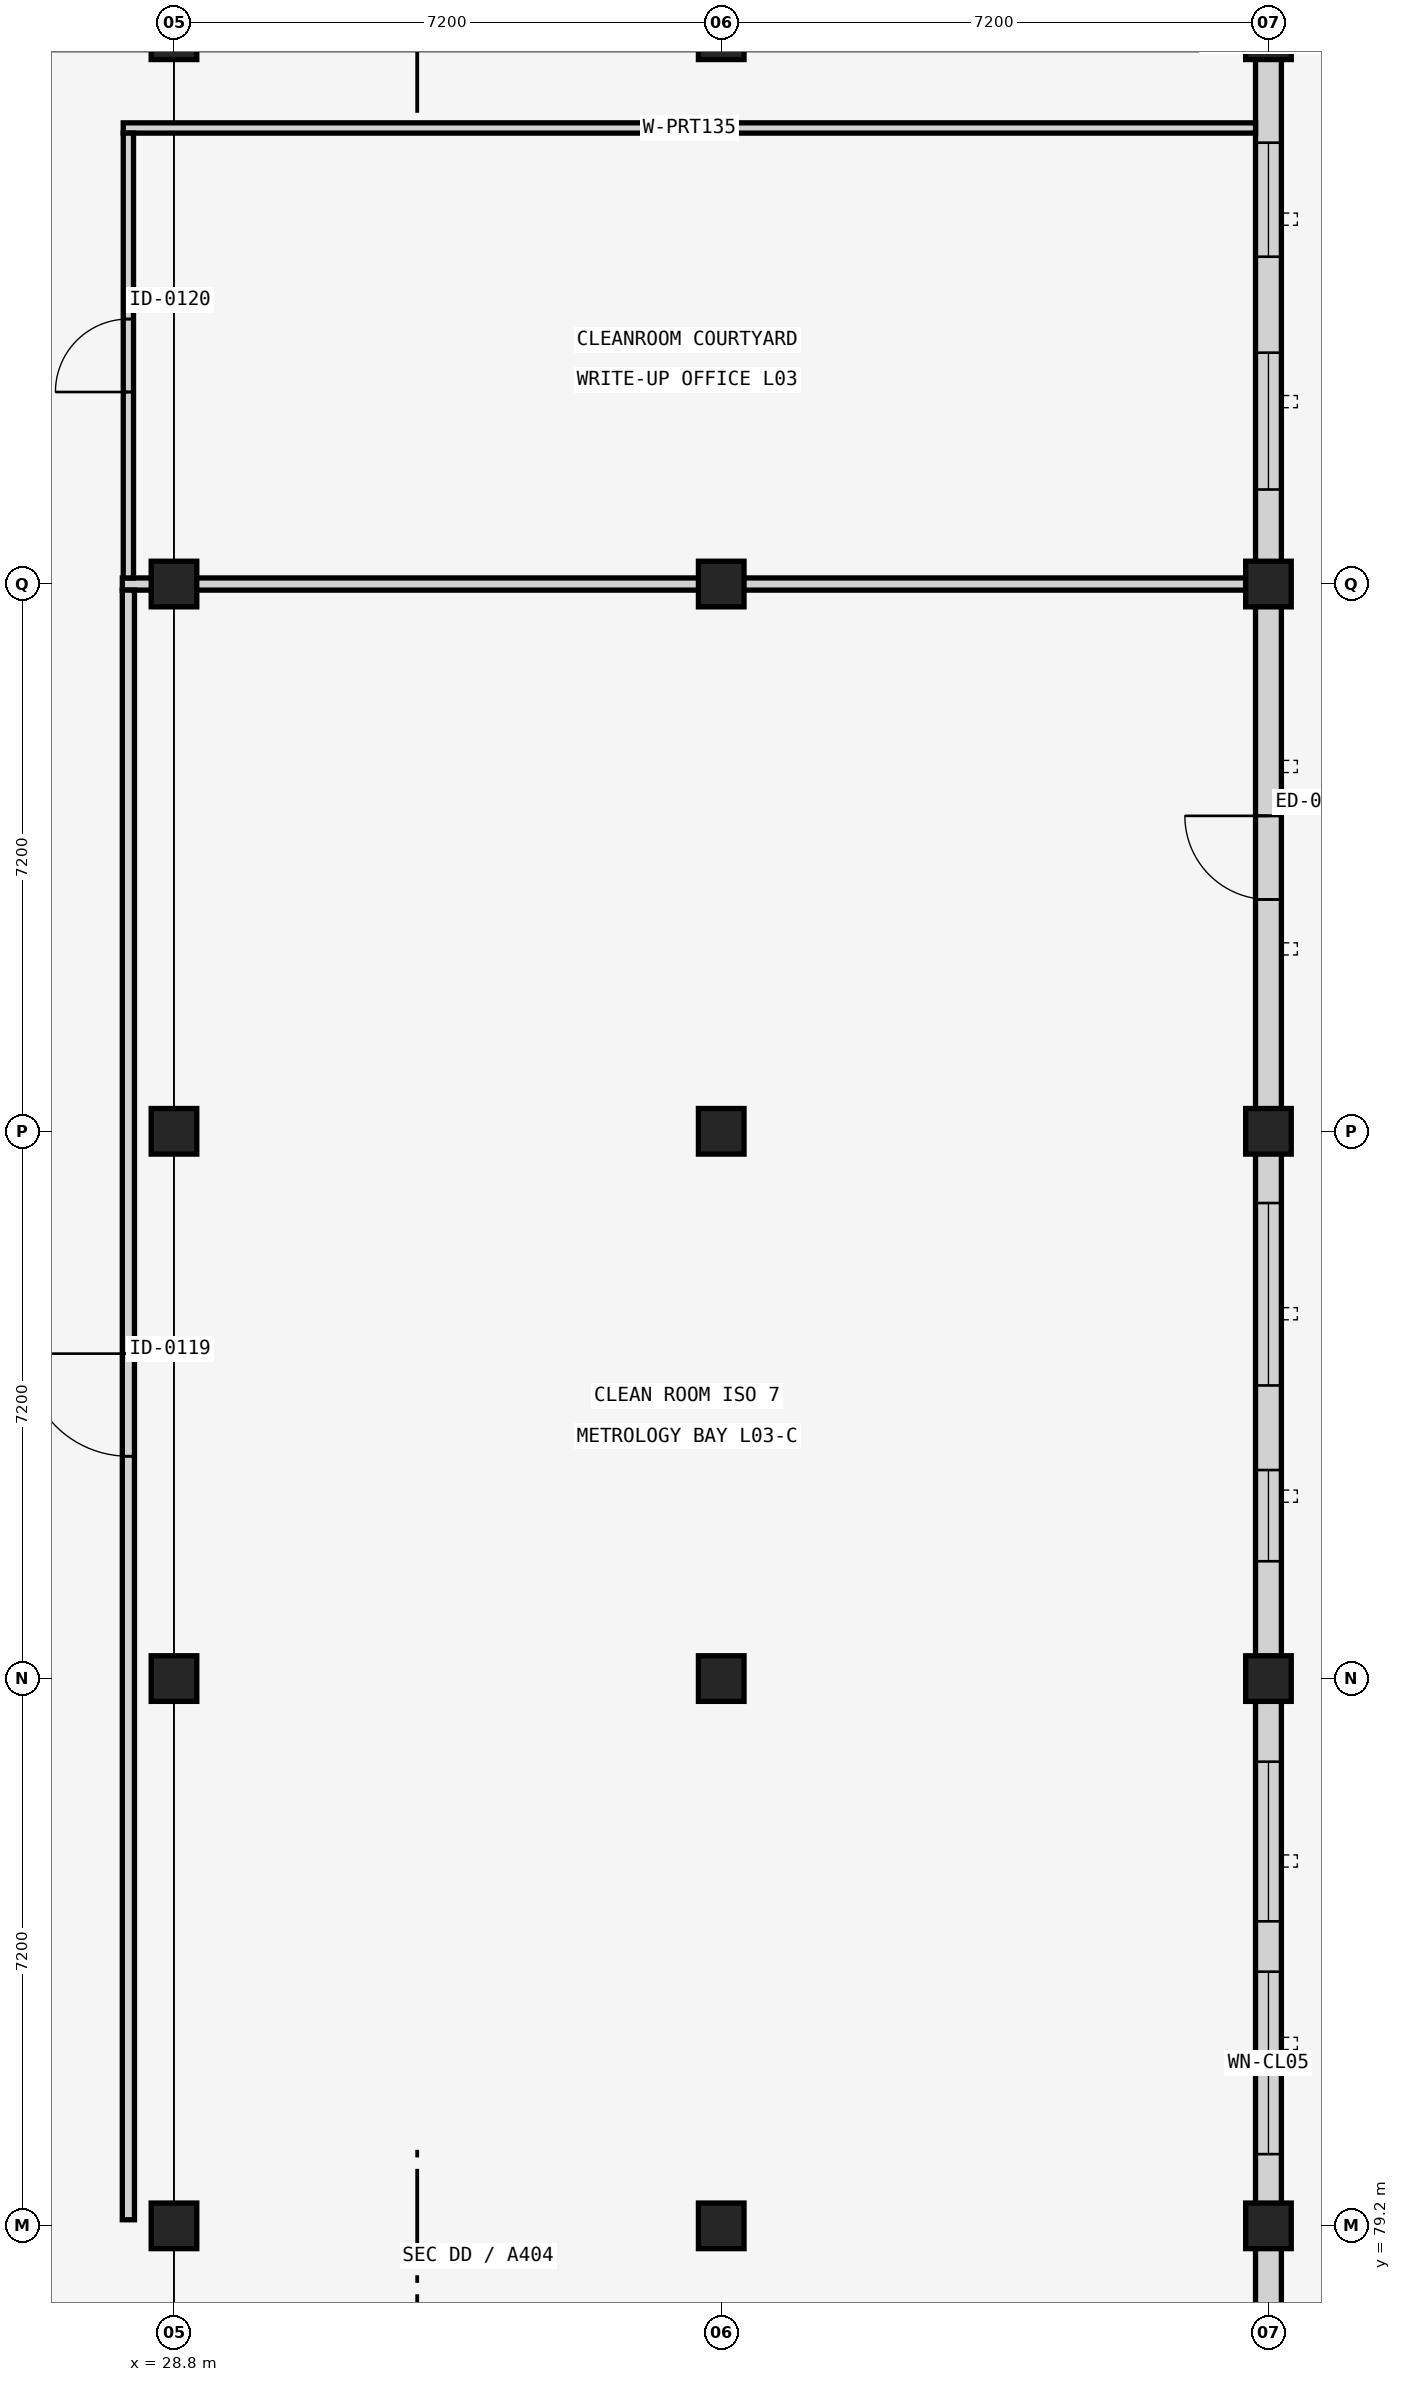
"""IFC4 building model, lengths in metres.
Left out: names, types, materials, properties, quantities, classifications, styles, units other than length and angle.
Written with IfcOpenShell. Run it as: python <this file> out.ifc"""

import sys

from ifc_helpers import new_model, si_unit, direction, frame, frame_2d, origin, origin_2d, place, context, subcontext, project, spatial, rectangle, extrude, element, fill, save


model = new_model("IFC4")
c1 = context("Model", 3, precision=1e-05, world=origin(), true_north=direction((0.0, 1.0)))
c2 = subcontext(c1, "Body", "Model", "MODEL_VIEW")
j1 = project(units=[si_unit("LENGTHUNIT", "METRE"), si_unit("PLANEANGLEUNIT", "RADIAN")], contexts=[c1])
p1 = place(None, origin())
s1 = spatial("IfcSite", under=j1, at=p1, CompositionType="ELEMENT")
p2 = place(p1, origin())
s2 = spatial("IfcBuilding", under=s1, at=p2, CompositionType="ELEMENT")
p3 = place(p2, frame((0.0, 0.0, 13.12)))
s3 = spatial("IfcBuildingStorey", under=s2, at=p3, CompositionType="ELEMENT", Elevation=13.12)
for number, where, z_axis, x_axis in (
    (1, (28.8, 79.2, 0.0), (0.0, 0.0, 1.0), (1.0, 0.0, 0.0)),
    (2, (28.8, 86.4, 0.0), (0.0, 0.0, 1.0), (1.0, 0.0, 0.0)),
    (3, (28.8, 93.6, 0.0), (0.0, 0.0, 1.0), (1.0, 0.0, 0.0)),
    (4, (28.8, 100.8, 0.0), (0.0, 0.0, 1.0), (1.0, 0.0, 0.0)),
    (5, (28.8, 108.0, 0.0), (0.0, 0.0, 1.0), (1.0, 0.0, 0.0)),
    (6, (36.0, 79.2, 0.0), (0.0, 0.0, 1.0), (1.0, 0.0, 0.0)),
    (7, (36.0, 86.4, 0.0), (0.0, 0.0, 1.0), (1.0, 0.0, 0.0)),
    (8, (36.0, 93.6, 0.0), (0.0, 0.0, 1.0), (1.0, 0.0, 0.0)),
    (9, (36.0, 100.8, 0.0), (0.0, 0.0, 1.0), (1.0, 0.0, 0.0)),
    (10, (36.0, 108.0, 0.0), (0.0, 0.0, 1.0), (1.0, 0.0, 0.0)),
    (11, (43.2, 79.2, 0.0), (0.0, 0.0, 1.0), (1.0, 0.0, 0.0)),
    (12, (43.2, 86.4, 0.0), (0.0, 0.0, 1.0), (1.0, 0.0, 0.0)),
    (13, (43.2, 93.6, 0.0), (0.0, 0.0, 1.0), (1.0, 0.0, 0.0)),
    (14, (43.2, 100.8, 0.0), (0.0, 0.0, 1.0), (1.0, 0.0, 0.0)),
    (15, (43.2, 108.0, 0.0), (0.0, 0.0, 1.0), (1.0, 0.0, 0.0)),
):
    element("IfcColumn", number, at=place(p3, frame(where, z_axis=z_axis, x_axis=x_axis)), inside=s3, PredefinedType="COLUMN", context=c2, shape_type="SweptSolid", body=[
        extrude(rectangle(XDim=0.6, YDim=0.6, at=origin_2d()), origin(), (0.0, 0.0, 1.0), 4.16),
    ])
p4 = place(p3, frame((43.2, 72.29, 0.0), z_axis=(0.0, 0.0, 1.0), x_axis=(0.0, 1.0, 0.0)))
e16 = element("IfcWall", 16, at=p4, inside=s3, PredefinedType="SOLIDWALL", context=c2, shape_type="SweptSolid", body=[
    extrude(rectangle(XDim=6.62, YDim=0.34, at=frame_2d((3.31, 0.0))), origin(), (0.0, 0.0, 1.0), 3.16),
])
p5 = place(p4, frame((0.804, 0.0, 1.0)))
e17 = element("IfcOpeningElement", 17, at=p5, cuts=e16, PredefinedType="OPENING", context=c2, shape_type="SweptSolid", body=[
    extrude(rectangle(XDim=2.1, YDim=1.5, at=frame_2d((1.05, 0.75))), frame((0.0, 0.18, 0.0), z_axis=(0.0, -1.0, 0.0), x_axis=(1.0, 0.0, 0.0)), (0.0, 0.0, 1.0), 0.36),
])
p6 = place(p4, frame((3.866, 0.0, 1.0)))
e18 = element("IfcOpeningElement", 18, at=p6, cuts=e16, PredefinedType="OPENING", context=c2, shape_type="SweptSolid", body=[
    extrude(rectangle(XDim=1.8, YDim=1.65, at=frame_2d((0.9, 0.825))), frame((0.0, 0.18, 0.0), z_axis=(0.0, -1.0, 0.0), x_axis=(1.0, 0.0, 0.0)), (0.0, 0.0, 1.0), 0.36),
])
p7 = place(p3, frame((43.2, 79.49, 0.0), z_axis=(0.0, 0.0, 1.0), x_axis=(0.0, 1.0, 0.0)))
e19 = element("IfcWall", 19, at=p7, inside=s3, PredefinedType="SOLIDWALL", context=c2, shape_type="SweptSolid", body=[
    extrude(rectangle(XDim=6.62, YDim=0.34, at=frame_2d((3.31, 0.0))), origin(), (0.0, 0.0, 1.0), 3.16),
])
p8 = place(p7, frame((0.654, 0.0, 1.0)))
e20 = element("IfcOpeningElement", 20, at=p8, cuts=e19, PredefinedType="OPENING", context=c2, shape_type="SweptSolid", body=[
    extrude(rectangle(XDim=2.4, YDim=1.5, at=frame_2d((1.2, 0.75))), frame((0.0, 0.18, 0.0), z_axis=(0.0, -1.0, 0.0), x_axis=(1.0, 0.0, 0.0)), (0.0, 0.0, 1.0), 0.36),
])
p9 = place(p7, frame((3.716, 0.0, 1.0)))
e21 = element("IfcOpeningElement", 21, at=p9, cuts=e19, PredefinedType="OPENING", context=c2, shape_type="SweptSolid", body=[
    extrude(rectangle(XDim=2.1, YDim=1.65, at=frame_2d((1.05, 0.825))), frame((0.0, 0.18, 0.0), z_axis=(0.0, -1.0, 0.0), x_axis=(1.0, 0.0, 0.0)), (0.0, 0.0, 1.0), 0.36),
])
p10 = place(p3, frame((43.2, 86.69, 0.0), z_axis=(0.0, 0.0, 1.0), x_axis=(0.0, 1.0, 0.0)))
e22 = element("IfcWall", 22, at=p10, inside=s3, PredefinedType="SOLIDWALL", context=c2, shape_type="SweptSolid", body=[
    extrude(rectangle(XDim=6.62, YDim=0.34, at=frame_2d((3.31, 0.0))), origin(), (0.0, 0.0, 1.0), 3.16),
])
p11 = place(p10, frame((1.254, 0.0, 1.0)))
e23 = element("IfcOpeningElement", 23, at=p11, cuts=e22, PredefinedType="OPENING", context=c2, shape_type="SweptSolid", body=[
    extrude(rectangle(XDim=1.2, YDim=1.65, at=frame_2d((0.6, 0.825))), frame((0.0, 0.18, 0.0), z_axis=(0.0, -1.0, 0.0), x_axis=(1.0, 0.0, 0.0)), (0.0, 0.0, 1.0), 0.36),
])
p12 = place(p10, frame((3.566, 0.0, 1.0)))
e24 = element("IfcOpeningElement", 24, at=p12, cuts=e22, PredefinedType="OPENING", context=c2, shape_type="SweptSolid", body=[
    extrude(rectangle(XDim=2.4, YDim=1.65, at=frame_2d((1.2, 0.825))), frame((0.0, 0.18, 0.0), z_axis=(0.0, -1.0, 0.0), x_axis=(1.0, 0.0, 0.0)), (0.0, 0.0, 1.0), 0.36),
])
p13 = place(p3, frame((43.2, 93.89, 0.0), z_axis=(0.0, 0.0, 1.0), x_axis=(0.0, 1.0, 0.0)))
e25 = element("IfcWall", 25, at=p13, inside=s3, PredefinedType="SOLIDWALL", context=c2, shape_type="SweptSolid", body=[
    extrude(rectangle(XDim=6.62, YDim=0.34, at=frame_2d((3.31, 0.0))), origin(), (0.0, 0.0, 1.0), 3.16),
])
p14 = place(p13, frame((2.76, 0.0, 0.0)))
e26 = element("IfcOpeningElement", 26, at=p14, cuts=e25, PredefinedType="OPENING", context=c2, shape_type="SweptSolid", body=[
    extrude(rectangle(XDim=1.1, YDim=2.2, at=frame_2d((0.55, 1.1))), frame((0.0, 0.18, 0.0), z_axis=(0.0, -1.0, 0.0), x_axis=(1.0, 0.0, 0.0)), (0.0, 0.0, 1.0), 0.36),
])
p15 = place(p3, frame((43.2, 101.09, 0.0), z_axis=(0.0, 0.0, 1.0), x_axis=(0.0, 1.0, 0.0)))
e27 = element("IfcWall", 27, at=p15, inside=s3, PredefinedType="SOLIDWALL", context=c2, shape_type="SweptSolid", body=[
    extrude(rectangle(XDim=6.62, YDim=0.34, at=frame_2d((3.31, 0.0))), origin(), (0.0, 0.0, 1.0), 3.16),
])
p16 = place(p15, frame((0.954, 0.0, 1.0)))
e28 = element("IfcOpeningElement", 28, at=p16, cuts=e27, PredefinedType="OPENING", context=c2, shape_type="SweptSolid", body=[
    extrude(rectangle(XDim=1.8, YDim=1.65, at=frame_2d((0.9, 0.825))), frame((0.0, 0.18, 0.0), z_axis=(0.0, -1.0, 0.0), x_axis=(1.0, 0.0, 0.0)), (0.0, 0.0, 1.0), 0.36),
])
p17 = place(p15, frame((4.016, 0.0, 1.0)))
e29 = element("IfcOpeningElement", 29, at=p17, cuts=e27, PredefinedType="OPENING", context=c2, shape_type="SweptSolid", body=[
    extrude(rectangle(XDim=1.5, YDim=1.5, at=frame_2d((0.75, 0.75))), frame((0.0, 0.18, 0.0), z_axis=(0.0, -1.0, 0.0), x_axis=(1.0, 0.0, 0.0)), (0.0, 0.0, 1.0), 0.36),
])
p18 = place(p3, frame((28.12, 100.8, 0.0), z_axis=(0.0, 0.0, 1.0), x_axis=(1.0, 0.0, 0.0)))
e30 = element("IfcWall", 30, at=p18, inside=s3, PredefinedType="PARTITIONING", context=c2, shape_type="SweptSolid", body=[
    extrude(rectangle(XDim=14.91, YDim=0.16, at=frame_2d((7.455, 0.0))), origin(), (0.0, 0.0, 1.0), 3.16),
])
p19 = place(p3, frame((28.2, 79.28, 0.0), z_axis=(0.0, 0.0, 1.0), x_axis=(0.0, 1.0, 0.0)))
e31 = element("IfcWall", 31, at=p19, inside=s3, PredefinedType="PARTITIONING", context=c2, shape_type="SweptSolid", body=[
    extrude(rectangle(XDim=21.44, YDim=0.16, at=frame_2d((10.72, 0.0))), origin(), (0.0, 0.0, 1.0), 3.16),
])
p20 = place(p19, frame((10.045, 0.0, 0.0)))
e32 = element("IfcOpeningElement", 32, at=p20, cuts=e31, PredefinedType="OPENING", context=c2, shape_type="SweptSolid", body=[
    extrude(rectangle(XDim=1.35, YDim=2.2, at=frame_2d((0.675, 1.1))), frame((0.0, 0.09, 0.0), z_axis=(0.0, -1.0, 0.0), x_axis=(1.0, 0.0, 0.0)), (0.0, 0.0, 1.0), 0.18),
])
p21 = place(p3, frame((28.133, 106.8, 0.0), z_axis=(0.0, 0.0, 1.0), x_axis=(1.0, 0.0, 0.0)))
e33 = element("IfcWall", 33, at=p21, inside=s3, PredefinedType="PARTITIONING", context=c2, shape_type="SweptSolid", body=[
    extrude(rectangle(XDim=14.897, YDim=0.135, at=frame_2d((7.449, 0.0))), origin(), (0.0, 0.0, 1.0), 3.21),
])
p22 = place(p3, frame((28.2, 100.88, 0.0), z_axis=(0.0, 0.0, 1.0), x_axis=(0.0, 1.0, 0.0)))
e34 = element("IfcWall", 34, at=p22, inside=s3, PredefinedType="PARTITIONING", context=c2, shape_type="SweptSolid", body=[
    extrude(rectangle(XDim=5.853, YDim=0.135, at=frame_2d((2.926, 0.0))), origin(), (0.0, 0.0, 1.0), 3.16),
])
p23 = place(p22, frame((2.446, 0.0, 0.0)))
e35 = element("IfcOpeningElement", 35, at=p23, cuts=e34, PredefinedType="OPENING", context=c2, shape_type="SweptSolid", body=[
    extrude(rectangle(XDim=0.96, YDim=2.15, at=frame_2d((0.48, 1.075))), frame((0.0, 0.078, 0.0), z_axis=(0.0, -1.0, 0.0), x_axis=(1.0, 0.0, 0.0)), (0.0, 0.0, 1.0), 0.155),
])
p24 = place(p8, origin())
e36 = element("IfcWindow", 36, at=p24, inside=s3, PartitioningType="SINGLE_PANEL", PredefinedType="WINDOW", context=c2, shape_type="SweptSolid", body=[
    extrude(rectangle(XDim=2.4, YDim=1.5, at=frame_2d((1.2, 0.75))), frame((0.0, 0.03, 0.0), z_axis=(0.0, -1.0, 0.0), x_axis=(1.0, 0.0, 0.0)), (0.0, 0.0, 1.0), 0.06),
])
fill(e20, e36)
p25 = place(p9, origin())
e37 = element("IfcWindow", 37, at=p25, inside=s3, PartitioningType="SINGLE_PANEL", PredefinedType="WINDOW", context=c2, shape_type="SweptSolid", body=[
    extrude(rectangle(XDim=2.1, YDim=1.65, at=frame_2d((1.05, 0.825))), frame((0.0, 0.03, 0.0), z_axis=(0.0, -1.0, 0.0), x_axis=(1.0, 0.0, 0.0)), (0.0, 0.0, 1.0), 0.06),
])
fill(e21, e37)
p26 = place(p11, origin())
e38 = element("IfcWindow", 38, at=p26, inside=s3, PartitioningType="SINGLE_PANEL", PredefinedType="WINDOW", context=c2, shape_type="SweptSolid", body=[
    extrude(rectangle(XDim=1.2, YDim=1.65, at=frame_2d((0.6, 0.825))), frame((0.0, 0.03, 0.0), z_axis=(0.0, -1.0, 0.0), x_axis=(1.0, 0.0, 0.0)), (0.0, 0.0, 1.0), 0.06),
])
fill(e23, e38)
p27 = place(p12, origin())
e39 = element("IfcWindow", 39, at=p27, inside=s3, PartitioningType="SINGLE_PANEL", PredefinedType="WINDOW", context=c2, shape_type="SweptSolid", body=[
    extrude(rectangle(XDim=2.4, YDim=1.65, at=frame_2d((1.2, 0.825))), frame((0.0, 0.03, 0.0), z_axis=(0.0, -1.0, 0.0), x_axis=(1.0, 0.0, 0.0)), (0.0, 0.0, 1.0), 0.06),
])
fill(e24, e39)
p28 = place(p14, frame((1.1, 0.0, 0.0), z_axis=(0.0, 0.0, 1.0), x_axis=(-1.0, 0.0, 0.0)))
e40 = element("IfcDoor", 40, at=p28, inside=s3, OperationType="SINGLE_SWING_RIGHT", PredefinedType="DOOR", context=c2, shape_type="SweptSolid", body=[
    extrude(rectangle(XDim=1.1, YDim=2.2, at=frame_2d((0.55, 1.1))), frame((0.0, 0.025, 0.0), z_axis=(0.0, -1.0, 0.0), x_axis=(1.0, 0.0, 0.0)), (0.0, 0.0, 1.0), 0.05),
])
fill(e26, e40)
p29 = place(p16, origin())
e41 = element("IfcWindow", 41, at=p29, inside=s3, PartitioningType="SINGLE_PANEL", PredefinedType="WINDOW", context=c2, shape_type="SweptSolid", body=[
    extrude(rectangle(XDim=1.8, YDim=1.65, at=frame_2d((0.9, 0.825))), frame((0.0, 0.03, 0.0), z_axis=(0.0, -1.0, 0.0), x_axis=(1.0, 0.0, 0.0)), (0.0, 0.0, 1.0), 0.06),
])
fill(e28, e41)
p30 = place(p17, origin())
e42 = element("IfcWindow", 42, at=p30, inside=s3, PartitioningType="SINGLE_PANEL", PredefinedType="WINDOW", context=c2, shape_type="SweptSolid", body=[
    extrude(rectangle(XDim=1.5, YDim=1.5, at=frame_2d((0.75, 0.75))), frame((0.0, 0.03, 0.0), z_axis=(0.0, -1.0, 0.0), x_axis=(1.0, 0.0, 0.0)), (0.0, 0.0, 1.0), 0.06),
])
fill(e29, e42)
p31 = place(p20, origin())
e43 = element("IfcDoor", 43, at=p31, inside=s3, OperationType="SINGLE_SWING_RIGHT", PredefinedType="DOOR", context=c2, shape_type="SweptSolid", body=[
    extrude(rectangle(XDim=1.35, YDim=2.2, at=frame_2d((0.675, 1.1))), frame((0.0, 0.025, 0.0), z_axis=(0.0, -1.0, 0.0), x_axis=(1.0, 0.0, 0.0)), (0.0, 0.0, 1.0), 0.05),
])
fill(e32, e43)
p32 = place(p23, origin())
e44 = element("IfcDoor", 44, at=p32, inside=s3, OperationType="SINGLE_SWING_LEFT", PredefinedType="DOOR", context=c2, shape_type="SweptSolid", body=[
    extrude(rectangle(XDim=0.96, YDim=2.15, at=frame_2d((0.48, 1.075))), frame((0.0, 0.025, 0.0), z_axis=(0.0, -1.0, 0.0), x_axis=(1.0, 0.0, 0.0)), (0.0, 0.0, 1.0), 0.05),
])
fill(e35, e44)
save(model, sys.argv[1])
